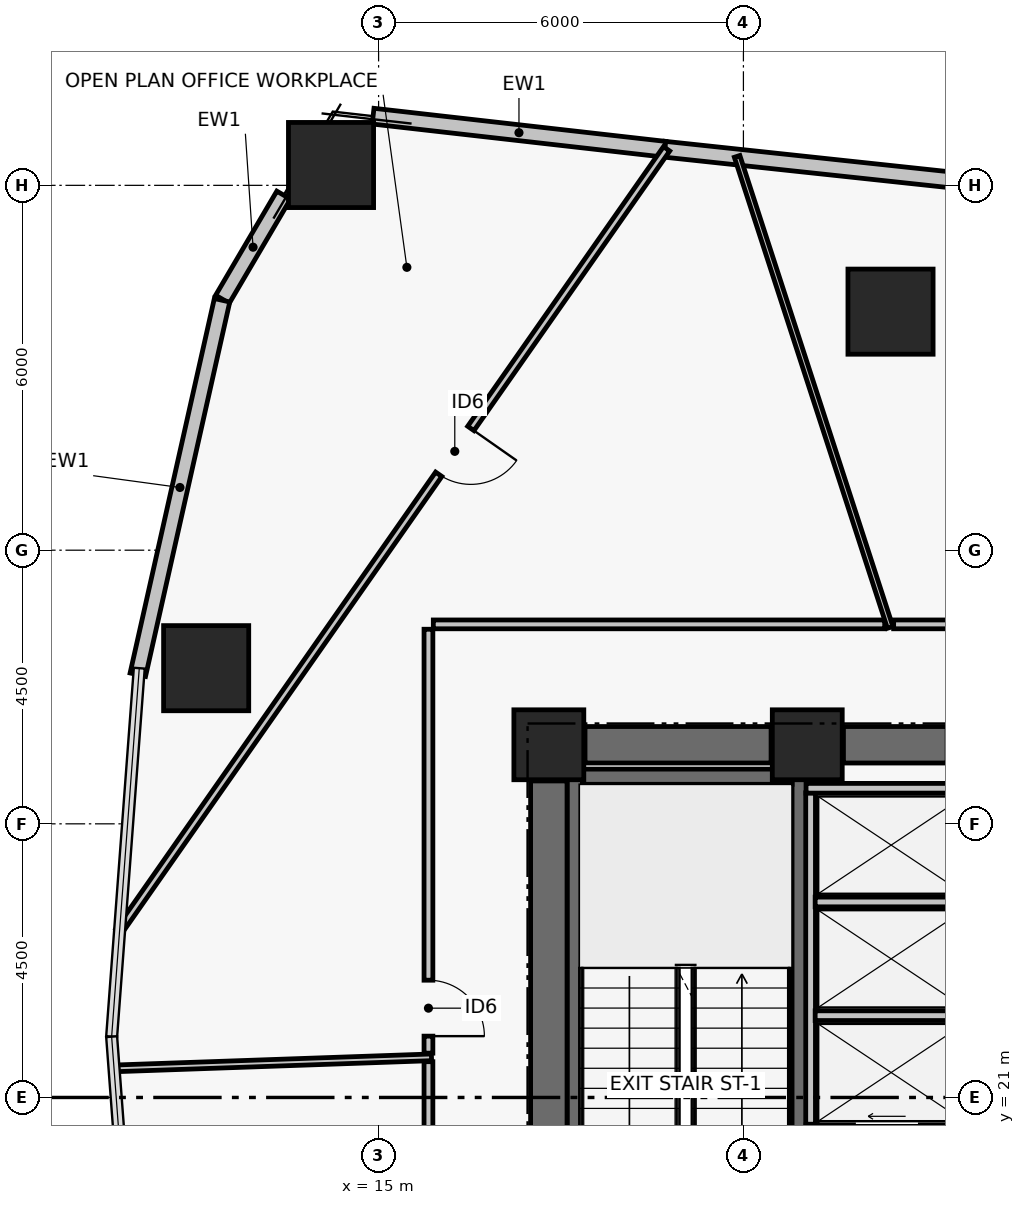
"""IFC4 building model, lengths in metres.
Left out: names, types, materials, properties, quantities, classifications, styles, units other than length and angle.
Written with IfcOpenShell. Run it as: python <this file> out.ifc"""

import sys

from ifc_helpers import new_model, si_unit, direction, frame, frame_2d, origin, origin_2d, place, context, subcontext, project, spatial, rectangle, hollow_rectangle, extrude, element, fill, save


model = new_model("IFC4")
c1 = context("Model", 3, precision=1e-05, world=origin(), true_north=direction((0.0, 1.0)))
c2 = subcontext(c1, "Body", "Model", "MODEL_VIEW")
j1 = project(units=[si_unit("LENGTHUNIT", "METRE"), si_unit("PLANEANGLEUNIT", "RADIAN")], contexts=[c1])
p1 = place(None, origin())
s1 = spatial("IfcSite", under=j1, at=p1, CompositionType="ELEMENT")
p2 = place(p1, origin())
s2 = spatial("IfcBuilding", under=s1, at=p2, CompositionType="ELEMENT")
p3 = place(p2, frame((0.0, 0.0, 57.36)))
s3 = spatial("IfcBuildingStorey", under=s2, at=p3, CompositionType="ELEMENT", Elevation=57.36)
for number, where, z_axis, x_axis in (
    (1, (17.8, 26.8, 0.0), (0.0, 0.0, 1.0), (1.0, 0.0, 0.0)),
    (2, (22.05, 26.8, 0.0), (0.0, 0.0, 1.0), (1.0, 0.0, 0.0)),
):
    element("IfcColumn", number, at=place(p3, frame(where, z_axis=z_axis, x_axis=x_axis)), inside=s3, PredefinedType="COLUMN", context=c2, shape_type="SweptSolid", body=[
        extrude(rectangle(XDim=1.15, YDim=1.15, at=origin_2d()), origin(), (0.0, 0.0, 1.0), 3.72),
    ])
p4 = place(p3, frame((18.395, 26.8, 0.0), z_axis=(0.0, 0.0, 1.0), x_axis=(1.0, 0.0, 0.0)))
e3 = element("IfcWall", 3, at=p4, inside=s3, PredefinedType="SHEAR", context=c2, shape_type="SweptSolid", body=[
    extrude(rectangle(XDim=3.06, YDim=0.6, at=frame_2d((1.53, 0.0))), origin(), (0.0, 0.0, 1.0), 3.47),
])
p5 = place(p3, frame((22.645, 26.8, 0.0), z_axis=(0.0, 0.0, 1.0), x_axis=(1.0, 0.0, 0.0)))
e4 = element("IfcWall", 4, at=p5, inside=s3, PredefinedType="SHEAR", context=c2, shape_type="SweptSolid", body=[
    extrude(rectangle(XDim=1.705, YDim=0.6, at=frame_2d((0.853, 0.0))), origin(), (0.0, 0.0, 1.0), 3.47),
])
p6 = place(p3, frame((17.8, 17.795, 0.0), z_axis=(0.0, 0.0, 1.0), x_axis=(0.0, 1.0, 0.0)))
e5 = element("IfcWall", 5, at=p6, inside=s3, PredefinedType="SHEAR", context=c2, shape_type="SweptSolid", body=[
    extrude(rectangle(XDim=8.41, YDim=0.6, at=frame_2d((4.205, 0.0))), origin(), (0.0, 0.0, 1.0), 3.47),
])
p7 = place(p3, frame((18.229, 17.6, 0.0), z_axis=(0.0, 0.0, 1.0), x_axis=(0.0, 1.0, 0.0)))
e6 = element("IfcWall", 6, at=p7, inside=s3, PredefinedType="SHEAR", context=c2, shape_type="SweptSolid", body=[
    extrude(rectangle(XDim=8.8, YDim=0.25, at=frame_2d((4.4, 0.0))), origin(), (0.0, 0.0, 1.0), 3.47),
])
p8 = place(p3, frame((21.925, 17.6, 0.0), z_axis=(0.0, 0.0, 1.0), x_axis=(0.0, 1.0, 0.0)))
e7 = element("IfcWall", 7, at=p8, inside=s3, PredefinedType="SHEAR", context=c2, shape_type="SweptSolid", body=[
    extrude(rectangle(XDim=8.8, YDim=0.25, at=frame_2d((4.4, 0.0))), origin(), (0.0, 0.0, 1.0), 3.47),
])
p9 = place(p8, frame((0.35, 0.0, 0.0)))
e8 = element("IfcOpeningElement", 8, at=p9, cuts=e7, PredefinedType="OPENING", context=c2, shape_type="SweptSolid", body=[
    extrude(rectangle(XDim=1.05, YDim=2.08, at=frame_2d((0.525, 1.04))), frame((0.0, 0.135, 0.0), z_axis=(0.0, -1.0, 0.0), x_axis=(1.0, 0.0, 0.0)), (0.0, 0.0, 1.0), 0.27),
])
p10 = place(p3, frame((18.354, 26.275, 0.0), z_axis=(0.0, 0.0, 1.0), x_axis=(1.0, 0.0, 0.0)))
e9 = element("IfcWall", 9, at=p10, inside=s3, PredefinedType="SHEAR", context=c2, shape_type="SweptSolid", body=[
    extrude(rectangle(XDim=3.446, YDim=0.25, at=frame_2d((1.723, 0.0))), origin(), (0.0, 0.0, 1.0), 3.47),
])
for number, where, z_axis, x_axis in (
    (10, (23.419, 33.923, 0.0), (0.0, 0.0, 1.0), (1.0, 0.0, 0.0)),
    (11, (14.218, 36.334, 0.0), (0.0, 0.0, 1.0), (1.0, 0.0, 0.0)),
    (12, (12.164, 28.06, 0.0), (0.0, 0.0, 1.0), (1.0, 0.0, 0.0)),
):
    element("IfcColumn", number, at=place(p3, frame(where, z_axis=z_axis, x_axis=x_axis)), inside=s3, PredefinedType="COLUMN", context=c2, shape_type="SweptSolid", body=[
        extrude(hollow_rectangle(XDim=1.4, YDim=1.4, WallThickness=0.055, at=origin_2d()), origin(), (0.0, 0.0, 1.0), 3.72),
    ])
p11 = place(p3, frame((19.696, 36.595, 0.0), z_axis=(0.0, 0.0, 1.0), x_axis=(0.994319088673, -0.106440358419, 0.0)))
e13 = element("IfcWall", 13, at=p11, inside=s3, PredefinedType="PARTITIONING", context=c2, shape_type="SweptSolid", body=[
    extrude(rectangle(XDim=9.757, YDim=0.26, at=frame_2d((4.879, 0.0))), origin(), (0.0, 0.0, 1.0), 3.47),
])
p12 = place(p3, frame((14.909, 37.138, 0.0), z_axis=(0.0, 0.0, 1.0), x_axis=(0.993630237788, -0.112689620435, 0.0)))
e14 = element("IfcWall", 14, at=p12, inside=s3, PredefinedType="PARTITIONING", context=c2, shape_type="SweptSolid", body=[
    extrude(rectangle(XDim=4.829, YDim=0.26, at=frame_2d((2.415, 0.0))), origin(), (0.0, 0.0, 1.0), 3.47),
])
p13 = place(p3, frame((12.432, 34.127, 0.0), z_axis=(0.0, 0.0, 1.0), x_axis=(0.506772954594, 0.862079562739, 0.0)))
e15 = element("IfcWall", 15, at=p13, inside=s3, PredefinedType="PARTITIONING", context=c2, shape_type="SweptSolid", body=[
    extrude(rectangle(XDim=1.986, YDim=0.26, at=frame_2d((0.993, 0.0))), origin(), (0.0, 0.0, 1.0), 3.47),
])
p14 = place(p3, frame((11.04, 27.952, 0.0), z_axis=(0.0, 0.0, 1.0), x_axis=(0.219505752381, 0.975611205692, 0.0)))
e16 = element("IfcWall", 16, at=p14, inside=s3, PredefinedType="PARTITIONING", context=c2, shape_type="SweptSolid", body=[
    extrude(rectangle(XDim=6.312, YDim=0.26, at=frame_2d((3.156, 0.0))), origin(), (0.0, 0.0, 1.0), 3.47),
])
p15 = place(p3, frame((22.03, 20.45, 0.0), z_axis=(0.0, 0.0, 1.0), x_axis=(1.0, 0.0, 0.0)))
e17 = element("IfcWall", 17, at=p15, inside=s3, PredefinedType="PARTITIONING", context=c2, shape_type="SweptSolid", body=[
    extrude(rectangle(XDim=2.8, YDim=0.2, at=frame_2d((1.4, 0.0))), origin(), (0.0, 0.0, 1.0), 3.47),
])
p16 = place(p15, frame((0.78, 0.0, 0.0)))
e18 = element("IfcOpeningElement", 18, at=p16, cuts=e17, PredefinedType="OPENING", context=c2, shape_type="SweptSolid", body=[
    extrude(rectangle(XDim=1.1, YDim=2.08, at=frame_2d((0.55, 1.04))), frame((0.0, 0.11, 0.0), z_axis=(0.0, -1.0, 0.0), x_axis=(1.0, 0.0, 0.0)), (0.0, 0.0, 1.0), 0.22),
])
p17 = place(p3, frame((22.105, 20.56, 0.0), z_axis=(0.0, 0.0, 1.0), x_axis=(0.0, 1.0, 0.0)))
e19 = element("IfcWall", 19, at=p17, inside=s3, PredefinedType="PARTITIONING", context=c2, shape_type="SweptSolid", body=[
    extrude(rectangle(XDim=5.45, YDim=0.16, at=frame_2d((2.725, 0.0))), origin(), (0.0, 0.0, 1.0), 3.47),
])
p18 = place(p3, frame((22.18, 22.345, 0.0), z_axis=(0.0, 0.0, 1.0), x_axis=(1.0, 0.0, 0.0)))
e20 = element("IfcWall", 20, at=p18, inside=s3, PredefinedType="PARTITIONING", context=c2, shape_type="SweptSolid", body=[
    extrude(rectangle(XDim=2.65, YDim=0.16, at=frame_2d((1.325, 0.0))), origin(), (0.0, 0.0, 1.0), 3.47),
])
p19 = place(p3, frame((22.18, 24.215, 0.0), z_axis=(0.0, 0.0, 1.0), x_axis=(1.0, 0.0, 0.0)))
e21 = element("IfcWall", 21, at=p19, inside=s3, PredefinedType="PARTITIONING", context=c2, shape_type="SweptSolid", body=[
    extrude(rectangle(XDim=2.49, YDim=0.16, at=frame_2d((1.245, 0.0))), origin(), (0.0, 0.0, 1.0), 3.47),
])
p20 = place(p3, frame((22.03, 26.085, 0.0), z_axis=(0.0, 0.0, 1.0), x_axis=(1.0, 0.0, 0.0)))
e22 = element("IfcWall", 22, at=p20, inside=s3, PredefinedType="PARTITIONING", context=c2, shape_type="SweptSolid", body=[
    extrude(rectangle(XDim=2.83, YDim=0.16, at=frame_2d((1.415, 0.0))), origin(), (0.0, 0.0, 1.0), 3.47),
])
p21 = place(p3, frame((15.82, 21.588, 0.0), z_axis=(0.0, 0.0, 1.0), x_axis=(0.0, -1.0, 0.0)))
e23 = element("IfcWall", 23, at=p21, inside=s3, PredefinedType="PARTITIONING", context=c2, shape_type="SweptSolid", body=[
    extrude(rectangle(XDim=8.298, YDim=0.145, at=frame_2d((4.149, 0.0))), origin(), (0.0, 0.0, 1.0), 2.6),
])
p22 = place(p3, frame((32.8, 28.78, 0.0), z_axis=(0.0, 0.0, 1.0), x_axis=(-1.0, 0.0, 0.0)))
e24 = element("IfcWall", 24, at=p22, inside=s3, PredefinedType="PARTITIONING", context=c2, shape_type="SweptSolid", body=[
    extrude(rectangle(XDim=9.329, YDim=0.145, at=frame_2d((4.665, 0.0))), origin(), (0.0, 0.0, 1.0), 3.0),
])
p23 = place(p22, frame((7.148, 0.0, 0.0)))
e25 = element("IfcOpeningElement", 25, at=p23, cuts=e24, PredefinedType="OPENING", context=c2, shape_type="SweptSolid", body=[
    extrude(rectangle(XDim=0.92, YDim=2.05, at=frame_2d((0.46, 1.025))), frame((0.0, 0.083, 0.0), z_axis=(0.0, -1.0, 0.0), x_axis=(1.0, 0.0, 0.0)), (0.0, 0.0, 1.0), 0.165),
])
p24 = place(p3, frame((23.323, 28.78, 0.0), z_axis=(0.0, 0.0, 1.0), x_axis=(-1.0, 0.0, 0.0)))
e26 = element("IfcWall", 26, at=p24, inside=s3, PredefinedType="PARTITIONING", context=c2, shape_type="SweptSolid", body=[
    extrude(rectangle(XDim=7.424, YDim=0.145, at=frame_2d((3.712, 0.0))), origin(), (0.0, 0.0, 1.0), 2.6),
])
p25 = place(p3, frame((15.82, 28.7, 0.0), z_axis=(0.0, 0.0, 1.0), x_axis=(0.0, -1.0, 0.0)))
e27 = element("IfcWall", 27, at=p25, inside=s3, PredefinedType="PARTITIONING", context=c2, shape_type="SweptSolid", body=[
    extrude(rectangle(XDim=6.971, YDim=0.145, at=frame_2d((3.486, 0.0))), origin(), (0.0, 0.0, 1.0), 2.6),
])
p26 = place(p25, frame((5.771, 0.0, 0.0)))
e28 = element("IfcOpeningElement", 28, at=p26, cuts=e27, PredefinedType="OPENING", context=c2, shape_type="SweptSolid", body=[
    extrude(rectangle(XDim=0.92, YDim=2.05, at=frame_2d((0.46, 1.025))), frame((0.0, 0.083, 0.0), z_axis=(0.0, -1.0, 0.0), x_axis=(1.0, 0.0, 0.0)), (0.0, 0.0, 1.0), 0.165),
])
p27 = place(p3, frame((23.413, 28.73, 0.0), z_axis=(0.0, 0.0, 1.0), x_axis=(-0.309033883912, 0.951051028386, 0.0)))
e29 = element("IfcWall", 29, at=p27, inside=s3, PredefinedType="PARTITIONING", context=c2, shape_type="SweptSolid", body=[
    extrude(rectangle(XDim=8.145, YDim=0.095, at=frame_2d((4.073, 0.0))), origin(), (0.0, 0.0, 1.0), 2.6),
])
p28 = place(p3, frame((15.87, 21.66, 0.0), z_axis=(0.0, 0.0, 1.0), x_axis=(-0.999391229301, -0.034887974962, 0.0)))
e30 = element("IfcWall", 30, at=p28, inside=s3, PredefinedType="PARTITIONING", context=c2, shape_type="SweptSolid", body=[
    extrude(rectangle(XDim=5.234, YDim=0.11, at=frame_2d((2.617, 0.0))), origin(), (0.0, 0.0, 1.0), 2.85),
])
p29 = place(p3, frame((19.737, 36.601, 0.0), z_axis=(0.0, 0.0, 1.0), x_axis=(-0.573585467262, -0.819145720703, 0.0)))
e31 = element("IfcWall", 31, at=p29, inside=s3, PredefinedType="PARTITIONING", context=c2, shape_type="SweptSolid", body=[
    extrude(rectangle(XDim=15.703, YDim=0.125, at=frame_2d((7.851, 0.0))), origin(), (0.0, 0.0, 1.0), 2.6),
])
p30 = place(p29, frame((5.614, 0.0, 0.0)))
e32 = element("IfcOpeningElement", 32, at=p30, cuts=e31, PredefinedType="OPENING", context=c2, shape_type="SweptSolid", body=[
    extrude(rectangle(XDim=0.92, YDim=2.05, at=frame_2d((0.46, 1.025))), frame((0.0, 0.073, 0.0), z_axis=(0.0, -1.0, 0.0), x_axis=(1.0, 0.0, 0.0)), (0.0, 0.0, 1.0), 0.145),
])
p31 = place(p26, origin())
e33 = element("IfcDoor", 33, at=p31, inside=s3, OperationType="SINGLE_SWING_RIGHT", PredefinedType="DOOR", context=c2, shape_type="SweptSolid", body=[
    extrude(rectangle(XDim=0.92, YDim=2.05, at=frame_2d((0.46, 1.025))), frame((0.0, 0.025, 0.0), z_axis=(0.0, -1.0, 0.0), x_axis=(1.0, 0.0, 0.0)), (0.0, 0.0, 1.0), 0.05),
])
fill(e28, e33)
p32 = place(p30, origin())
e34 = element("IfcDoor", 34, at=p32, inside=s3, OperationType="SINGLE_SWING_LEFT", PredefinedType="DOOR", context=c2, shape_type="SweptSolid", body=[
    extrude(rectangle(XDim=0.92, YDim=2.05, at=frame_2d((0.46, 1.025))), frame((0.0, 0.025, 0.0), z_axis=(0.0, -1.0, 0.0), x_axis=(1.0, 0.0, 0.0)), (0.0, 0.0, 1.0), 0.05),
])
fill(e32, e34)
save(model, sys.argv[1])
